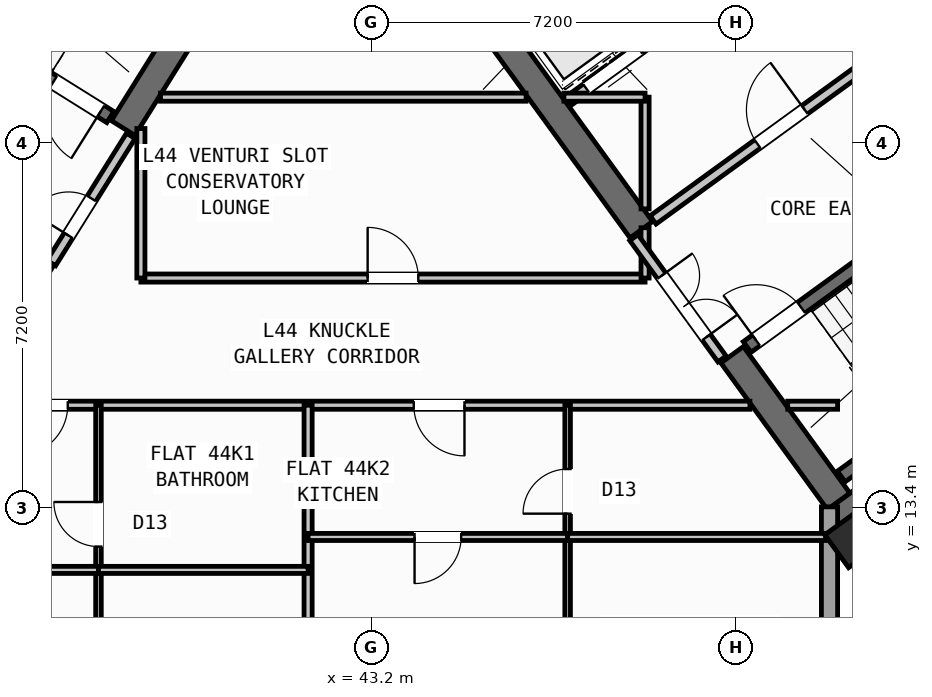
"""IFC4 building model, lengths in metres.
Left out: names, types, materials, properties, quantities, classifications, styles, units other than length and angle.
Written with IfcOpenShell. Run it as: python <this file> out.ifc"""

import sys

from ifc_helpers import new_model, si_unit, direction, frame, frame_2d, origin, origin_2d, place, context, subcontext, project, spatial, rectangle, hollow_rectangle, extrude, source, transform, mapped, element, fill, save


model = new_model("IFC4")
c1 = context("Model", 3, precision=1e-05, world=origin(), true_north=direction((0.0, 1.0)))
c2 = subcontext(c1, "Body", "Model", "MODEL_VIEW")
j1 = project(units=[si_unit("LENGTHUNIT", "METRE"), si_unit("PLANEANGLEUNIT", "RADIAN")], contexts=[c1])
p1 = place(None, origin())
s1 = spatial("IfcSite", under=j1, at=p1, CompositionType="ELEMENT")
p2 = place(p1, origin())
s2 = spatial("IfcBuilding", under=s1, at=p2, CompositionType="ELEMENT")
p3 = place(p2, frame((0.0, 0.0, 174.9)))
s3 = spatial("IfcBuildingStorey", under=s2, at=p3, CompositionType="ELEMENT", Elevation=174.9)
p4 = place(p3, frame((40.194, 23.922, 0.0), z_axis=(0.0, 0.0, 1.0), x_axis=(-0.529888438328, -0.848067357541, 0.0)))
e1 = element("IfcWall", 1, at=p4, inside=s3, PredefinedType="SHEAR", context=c2, shape_type="SweptSolid", body=[
    extrude(rectangle(XDim=3.575, YDim=0.55, at=frame_2d((1.788, 0.0))), origin(), (0.0, 0.0, 1.0), 4.22),
])
p5 = place(p3, frame((36.683, 18.304, 0.0), z_axis=(0.0, 0.0, 1.0), x_axis=(-0.529896466841, -0.848062341122, 0.0)))
e2 = element("IfcWall", 2, at=p5, inside=s3, PredefinedType="SHEAR", context=c2, shape_type="SweptSolid", body=[
    extrude(rectangle(XDim=6.425, YDim=0.55, at=frame_2d((3.212, 0.0))), origin(), (0.0, 0.0, 1.0), 4.22),
])
p6 = place(p3, frame((52.359, 13.14, 0.0), z_axis=(0.0, 0.0, 1.0), x_axis=(0.809014896919, 0.587788139183, 0.0)))
e3 = element("IfcWall", 3, at=p6, inside=s3, PredefinedType="SHEAR", context=c2, shape_type="SweptSolid", body=[
    extrude(rectangle(XDim=12.34, YDim=0.55, at=frame_2d((6.17, 0.0))), origin(), (0.0, 0.0, 1.0), 4.22),
])
p7 = place(p3, frame((52.42, 13.524, 0.0), z_axis=(0.0, 0.0, 1.0), x_axis=(-0.587802113096, 0.809004744015, 0.0)))
e4 = element("IfcWall", 4, at=p7, inside=s3, PredefinedType="SHEAR", context=c2, shape_type="SweptSolid", body=[
    extrude(rectangle(XDim=3.575, YDim=0.55, at=frame_2d((1.788, 0.0))), origin(), (0.0, 0.0, 1.0), 4.22),
])
p8 = place(p3, frame((48.526, 18.884, 0.0), z_axis=(0.0, 0.0, 1.0), x_axis=(-0.587764933797, 0.809031756236, 0.0)))
e5 = element("IfcWall", 5, at=p8, inside=s3, PredefinedType="SHEAR", context=c2, shape_type="SweptSolid", body=[
    extrude(rectangle(XDim=6.425, YDim=0.55, at=frame_2d((3.212, 0.0))), origin(), (0.0, 0.0, 1.0), 4.22),
])
m1 = source(origin(), c2, "Body", "SweptSolid", [
    extrude(hollow_rectangle(XDim=0.8, YDim=0.8, WallThickness=0.032, at=origin_2d()), origin(), (0.0, 0.0, 1.0), 4.5),
])
p9 = place(p3, frame((52.705, 12.773, 0.0), z_axis=(0.0, 0.0, 1.0), x_axis=(0.809016994375, 0.587785252292, 0.0)))
e6 = element("IfcColumn", 6, at=p9, inside=s3, PredefinedType="COLUMN", context=c2, shape_type="MappedRepresentation", body=[
    mapped(m1, transform((0.0, 0.0, 0.0), scale=1.0)),
])
p10 = place(p3, frame((56.581, 7.439, 0.0), z_axis=(0.0, 0.0, 1.0), x_axis=(-0.587771678454, 0.809026856172, 0.0)))
e7 = element("IfcWall", 7, at=p10, inside=s3, PredefinedType="STANDARD", context=c2, shape_type="SweptSolid", body=[
    extrude(rectangle(XDim=6.824, YDim=0.32, at=frame_2d((3.412, 0.0))), origin(), (0.0, 0.0, 1.0), 4.22),
])
p11 = place(p3, frame((52.24, 13.414, 0.0), z_axis=(0.0, 0.0, 1.0), x_axis=(0.0, -1.0, 0.0)))
e8 = element("IfcWall", 8, at=p11, inside=s3, PredefinedType="STANDARD", context=c2, shape_type="SweptSolid", body=[
    extrude(rectangle(XDim=9.948, YDim=0.32, at=frame_2d((4.974, 0.0))), origin(), (0.0, 0.0, 1.0), 4.22),
])
p12 = place(p11, frame((2.92, 0.0, 0.8)))
e9 = element("IfcOpeningElement", 9, at=p12, cuts=e8, PredefinedType="OPENING", context=c2, shape_type="SweptSolid", body=[
    extrude(rectangle(XDim=2.1, YDim=1.55, at=frame_2d((1.05, 0.775))), frame((0.0, 0.17, 0.0), z_axis=(0.0, -1.0, 0.0), x_axis=(1.0, 0.0, 0.0)), (0.0, 0.0, 1.0), 0.34),
])
p13 = place(p11, frame((7.033, 0.0, 0.85)))
e10 = element("IfcOpeningElement", 10, at=p13, cuts=e8, PredefinedType="OPENING", context=c2, shape_type="SweptSolid", body=[
    extrude(rectangle(XDim=1.8, YDim=1.5, at=frame_2d((0.9, 0.75))), frame((0.0, 0.17, 0.0), z_axis=(0.0, -1.0, 0.0), x_axis=(1.0, 0.0, 0.0)), (0.0, 0.0, 1.0), 0.34),
])
p14 = place(p3, frame((38.046, 21.108, 0.0), z_axis=(0.0, 0.0, 1.0), x_axis=(-0.848054434086, 0.529909121291, 0.0)))
e11 = element("IfcWall", 11, at=p14, inside=s3, PredefinedType="SHEAR", context=c2, shape_type="SweptSolid", body=[
    extrude(rectangle(XDim=7.33, YDim=0.26, at=frame_2d((3.665, 0.0))), origin(), (0.0, 0.0, 1.0), 4.22),
])
p15 = place(p14, frame((0.22, 0.0, 0.0)))
e12 = element("IfcOpeningElement", 12, at=p15, cuts=e11, PredefinedType="OPENING", context=c2, shape_type="SweptSolid", body=[
    extrude(rectangle(XDim=1.1, YDim=2.1, at=frame_2d((0.55, 1.05))), frame((0.0, 0.14, 0.0), z_axis=(0.0, -1.0, 0.0), x_axis=(1.0, 0.0, 0.0)), (0.0, 0.0, 1.0), 0.28),
])
p16 = place(p3, frame((52.472, 14.013, 0.0), z_axis=(0.0, 0.0, 1.0), x_axis=(0.809028366311, 0.587769599847, 0.0)))
e13 = element("IfcWall", 13, at=p16, inside=s3, PredefinedType="SHEAR", context=c2, shape_type="SweptSolid", body=[
    extrude(rectangle(XDim=7.33, YDim=0.26, at=frame_2d((3.665, 0.0))), origin(), (0.0, 0.0, 1.0), 4.22),
])
p17 = place(p3, frame((50.615, 16.57, 0.0), z_axis=(0.0, 0.0, 1.0), x_axis=(0.809028366311, 0.587769599847, 0.0)))
e14 = element("IfcWall", 14, at=p17, inside=s3, PredefinedType="SHEAR", context=c2, shape_type="SweptSolid", body=[
    extrude(rectangle(XDim=7.33, YDim=0.26, at=frame_2d((3.665, 0.0))), origin(), (0.0, 0.0, 1.0), 4.22),
])
p18 = place(p17, frame((0.22, 0.0, 0.0)))
e15 = element("IfcOpeningElement", 15, at=p18, cuts=e14, PredefinedType="OPENING", context=c2, shape_type="SweptSolid", body=[
    extrude(rectangle(XDim=1.1, YDim=2.1, at=frame_2d((0.55, 1.05))), frame((0.0, 0.14, 0.0), z_axis=(0.0, -1.0, 0.0), x_axis=(1.0, 0.0, 0.0)), (0.0, 0.0, 1.0), 0.28),
])
p19 = place(p3, frame((47.065, 21.407, 0.0), z_axis=(0.0, 0.0, 1.0), x_axis=(0.809032984992, 0.587763242466, 0.0)))
e16 = element("IfcWall", 16, at=p19, inside=s3, PredefinedType="STANDARD", context=c2, shape_type="SweptSolid", body=[
    extrude(rectangle(XDim=3.448, YDim=0.2, at=frame_2d((1.724, 0.0))), origin(), (0.0, 0.0, 1.0), 4.21),
])
p20 = place(p19, frame((0.458, 0.0, 0.0)))
e17 = element("IfcOpeningElement", 17, at=p20, cuts=e16, PredefinedType="OPENING", context=c2, shape_type="SweptSolid", body=[
    extrude(rectangle(XDim=1.3, YDim=2.2, at=frame_2d((0.65, 1.1))), frame((0.0, 0.11, 0.0), z_axis=(0.0, -1.0, 0.0), x_axis=(1.0, 0.0, 0.0)), (0.0, 0.0, 1.0), 0.22),
])
p21 = place(p3, frame((48.758, 19.077, 0.0), z_axis=(0.0, 0.0, 1.0), x_axis=(0.809005065155, 0.587801671104, 0.0)))
e18 = element("IfcWall", 18, at=p21, inside=s3, PredefinedType="STANDARD", context=c2, shape_type="SweptSolid", body=[
    extrude(rectangle(XDim=5.768, YDim=0.2, at=frame_2d((2.884, 0.0))), origin(), (0.0, 0.0, 1.0), 4.21),
])
p22 = place(p21, frame((2.548, 0.0, 0.0)))
e19 = element("IfcOpeningElement", 19, at=p22, cuts=e18, PredefinedType="OPENING", context=c2, shape_type="SweptSolid", body=[
    extrude(rectangle(XDim=1.15, YDim=2.1, at=frame_2d((0.575, 1.05))), frame((0.0, 0.11, 0.0), z_axis=(0.0, -1.0, 0.0), x_axis=(1.0, 0.0, 0.0)), (0.0, 0.0, 1.0), 0.22),
])
p23 = place(p3, frame((38.451, 20.737, 0.0), z_axis=(0.0, 0.0, 1.0), x_axis=(-0.529924799939, -0.848044637038, 0.0)))
e20 = element("IfcWall", 20, at=p23, inside=s3, PredefinedType="STANDARD", context=c2, shape_type="SweptSolid", body=[
    extrude(rectangle(XDim=2.96, YDim=0.2, at=frame_2d((1.48, 0.0))), origin(), (0.0, 0.0, 1.0), 2.395),
])
p24 = place(p23, frame((1.46, 0.0, 0.0)))
e21 = element("IfcOpeningElement", 21, at=p24, cuts=e20, PredefinedType="OPENING", context=c2, shape_type="SweptSolid", body=[
    extrude(rectangle(XDim=0.86, YDim=2.05, at=frame_2d((0.43, 1.025))), frame((0.0, 0.11, 0.0), z_axis=(0.0, -1.0, 0.0), x_axis=(1.0, 0.0, 0.0)), (0.0, 0.0, 1.0), 0.22),
])
p25 = place(p3, frame((35.237, 15.42, 0.0), z_axis=(0.0, 0.0, 1.0), x_axis=(1.0, 0.0, 0.0)))
e22 = element("IfcWall", 22, at=p25, inside=s3, PredefinedType="PARTITIONING", context=c2, shape_type="SweptSolid", body=[
    extrude(rectangle(XDim=15.432, YDim=0.16, at=frame_2d((7.716, 0.0))), origin(), (0.0, 0.0, 1.0), 4.21),
])
p26 = place(p25, frame((0.969, 0.0, 0.0)))
e23 = element("IfcOpeningElement", 23, at=p26, cuts=e22, PredefinedType="OPENING", context=c2, shape_type="SweptSolid", body=[
    extrude(rectangle(XDim=1.0, YDim=2.1, at=frame_2d((0.5, 1.05))), frame((0.0, 0.09, 0.0), z_axis=(0.0, -1.0, 0.0), x_axis=(1.0, 0.0, 0.0)), (0.0, 0.0, 1.0), 0.18),
])
p27 = place(p25, frame((8.799, 0.0, 0.0)))
e24 = element("IfcOpeningElement", 24, at=p27, cuts=e22, PredefinedType="OPENING", context=c2, shape_type="SweptSolid", body=[
    extrude(rectangle(XDim=1.0, YDim=2.1, at=frame_2d((0.5, 1.05))), frame((0.0, 0.09, 0.0), z_axis=(0.0, -1.0, 0.0), x_axis=(1.0, 0.0, 0.0)), (0.0, 0.0, 1.0), 0.18),
])
p28 = place(p3, frame((51.416, 15.42, 0.0), z_axis=(0.0, 0.0, 1.0), x_axis=(1.0, 0.0, 0.0)))
e25 = element("IfcWall", 25, at=p28, inside=s3, PredefinedType="PARTITIONING", context=c2, shape_type="SweptSolid", body=[
    extrude(rectangle(XDim=0.984, YDim=0.16, at=frame_2d((0.492, 0.0))), origin(), (0.0, 0.0, 1.0), 4.21),
])
p29 = place(p3, frame((38.65, 17.93, 0.0), z_axis=(0.0, 0.0, 1.0), x_axis=(1.0, 0.0, 0.0)))
e26 = element("IfcWall", 26, at=p29, inside=s3, PredefinedType="PARTITIONING", context=c2, shape_type="SweptSolid", body=[
    extrude(rectangle(XDim=9.95, YDim=0.16, at=frame_2d((4.975, 0.0))), origin(), (0.0, 0.0, 1.0), 4.21),
])
p30 = place(p29, frame((4.475, 0.0, 0.0)))
e27 = element("IfcOpeningElement", 27, at=p30, cuts=e26, PredefinedType="OPENING", context=c2, shape_type="SweptSolid", body=[
    extrude(rectangle(XDim=1.0, YDim=2.1, at=frame_2d((0.5, 1.05))), frame((0.0, 0.09, 0.0), z_axis=(0.0, -1.0, 0.0), x_axis=(1.0, 0.0, 0.0)), (0.0, 0.0, 1.0), 0.18),
])
p31 = place(p3, frame((38.65, 17.93, 0.0), z_axis=(0.0, 0.0, 1.0), x_axis=(0.0, 1.0, 0.0)))
e28 = element("IfcWall", 28, at=p31, inside=s3, PredefinedType="PARTITIONING", context=c2, shape_type="SweptSolid", body=[
    extrude(rectangle(XDim=2.951, YDim=0.16, at=frame_2d((1.476, 0.0))), origin(), (0.0, 0.0, 1.0), 4.21),
])
p32 = place(p3, frame((48.6, 17.93, 0.0), z_axis=(0.0, 0.0, 1.0), x_axis=(0.0, 1.0, 0.0)))
e29 = element("IfcWall", 29, at=p32, inside=s3, PredefinedType="PARTITIONING", context=c2, shape_type="SweptSolid", body=[
    extrude(rectangle(XDim=0.993, YDim=0.16, at=frame_2d((0.496, 0.0))), origin(), (0.0, 0.0, 1.0), 4.21),
])
p33 = place(p3, frame((48.6, 19.295, 0.0), z_axis=(0.0, 0.0, 1.0), x_axis=(0.0, 1.0, 0.0)))
e30 = element("IfcWall", 30, at=p33, inside=s3, PredefinedType="PARTITIONING", context=c2, shape_type="SweptSolid", body=[
    extrude(rectangle(XDim=2.205, YDim=0.16, at=frame_2d((1.103, 0.0))), origin(), (0.0, 0.0, 1.0), 4.21),
])
p34 = place(p3, frame((39.037, 21.5, 0.0), z_axis=(0.0, 0.0, 1.0), x_axis=(1.0, 0.0, 0.0)))
e31 = element("IfcWall", 31, at=p34, inside=s3, PredefinedType="PARTITIONING", context=c2, shape_type="SweptSolid", body=[
    extrude(rectangle(XDim=7.215, YDim=0.16, at=frame_2d((3.607, 0.0))), origin(), (0.0, 0.0, 1.0), 4.21),
])
p35 = place(p3, frame((46.998, 21.5, 0.0), z_axis=(0.0, 0.0, 1.0), x_axis=(1.0, 0.0, 0.0)))
e32 = element("IfcWall", 32, at=p35, inside=s3, PredefinedType="PARTITIONING", context=c2, shape_type="SweptSolid", body=[
    extrude(rectangle(XDim=1.602, YDim=0.16, at=frame_2d((0.801, 0.0))), origin(), (0.0, 0.0, 1.0), 4.21),
])
p36 = place(p3, frame((50.119, 16.333, 0.0), z_axis=(0.0, 0.0, 1.0), x_axis=(-0.587749856981, 0.809042709391, 0.0)))
e33 = element("IfcWall", 33, at=p36, inside=s3, PredefinedType="STANDARD", context=c2, shape_type="SweptSolid", body=[
    extrude(rectangle(XDim=2.96, YDim=0.2, at=frame_2d((1.48, 0.0))), origin(), (0.0, 0.0, 1.0), 2.395),
])
p37 = place(p36, frame((0.53, 0.0, 0.0)))
e34 = element("IfcOpeningElement", 34, at=p37, cuts=e33, PredefinedType="OPENING", context=c2, shape_type="SweptSolid", body=[
    extrude(rectangle(XDim=1.5, YDim=2.15, at=frame_2d((0.75, 1.075))), frame((0.0, 0.11, 0.0), z_axis=(0.0, -1.0, 0.0), x_axis=(1.0, 0.0, 0.0)), (0.0, 0.0, 1.0), 0.22),
])
p38 = place(p3, frame((41.95, 1.96, 0.0), z_axis=(0.0, 0.0, 1.0), x_axis=(0.0, 1.0, 0.0)))
e35 = element("IfcWall", 35, at=p38, inside=s3, PredefinedType="PARTITIONING", context=c2, shape_type="SweptSolid", body=[
    extrude(rectangle(XDim=13.46, YDim=0.16, at=frame_2d((6.73, 0.0))), origin(), (0.0, 0.0, 1.0), 4.21),
])
p39 = place(p3, frame((37.813, 1.96, 0.0), z_axis=(0.0, 0.0, 1.0), x_axis=(0.0, 1.0, 0.0)))
e36 = element("IfcWall", 36, at=p39, inside=s3, PredefinedType="PARTITIONING", context=c2, shape_type="SweptSolid", body=[
    extrude(rectangle(XDim=13.46, YDim=0.11, at=frame_2d((6.73, 0.0))), origin(), (0.0, 0.0, 1.0), 4.21),
])
p40 = place(p39, frame((5.5, 0.0, 0.0)))
e37 = element("IfcOpeningElement", 37, at=p40, cuts=e36, PredefinedType="OPENING", context=c2, shape_type="SweptSolid", body=[
    extrude(rectangle(XDim=0.92, YDim=2.08, at=frame_2d((0.46, 1.04))), frame((0.0, 0.065, 0.0), z_axis=(0.0, -1.0, 0.0), x_axis=(1.0, 0.0, 0.0)), (0.0, 0.0, 1.0), 0.13),
])
p41 = place(p39, frame((10.67, 0.0, 0.0)))
e38 = element("IfcOpeningElement", 38, at=p41, cuts=e36, PredefinedType="OPENING", context=c2, shape_type="SweptSolid", body=[
    extrude(rectangle(XDim=0.88, YDim=2.08, at=frame_2d((0.44, 1.04))), frame((0.0, 0.065, 0.0), z_axis=(0.0, -1.0, 0.0), x_axis=(1.0, 0.0, 0.0)), (0.0, 0.0, 1.0), 0.13),
])
p42 = place(p3, frame((33.584, 12.17, 0.0), z_axis=(0.0, 0.0, 1.0), x_axis=(1.0, 0.0, 0.0)))
e39 = element("IfcWall", 39, at=p42, inside=s3, PredefinedType="PLUMBINGWALL", context=c2, shape_type="SweptSolid", body=[
    extrude(rectangle(XDim=4.229, YDim=0.14, at=frame_2d((2.115, 0.0))), origin(), (0.0, 0.0, 1.0), 3.395),
])
p43 = place(p42, frame((0.913, 0.0, 0.0)))
e40 = element("IfcOpeningElement", 40, at=p43, cuts=e39, PredefinedType="OPENING", context=c2, shape_type="SweptSolid", body=[
    extrude(rectangle(XDim=0.92, YDim=2.08, at=frame_2d((0.46, 1.04))), frame((0.0, 0.08, 0.0), z_axis=(0.0, -1.0, 0.0), x_axis=(1.0, 0.0, 0.0)), (0.0, 0.0, 1.0), 0.16),
])
p44 = place(p3, frame((37.813, 12.17, 0.0), z_axis=(0.0, 0.0, 1.0), x_axis=(1.0, 0.0, 0.0)))
e41 = element("IfcWall", 41, at=p44, inside=s3, PredefinedType="PLUMBINGWALL", context=c2, shape_type="SweptSolid", body=[
    extrude(rectangle(XDim=4.137, YDim=0.14, at=frame_2d((2.068, 0.0))), origin(), (0.0, 0.0, 1.0), 3.395),
])
p45 = place(p3, frame((47.072, 1.96, 0.0), z_axis=(0.0, 0.0, 1.0), x_axis=(0.0, 1.0, 0.0)))
e42 = element("IfcWall", 42, at=p45, inside=s3, PredefinedType="PARTITIONING", context=c2, shape_type="SweptSolid", body=[
    extrude(rectangle(XDim=13.46, YDim=0.11, at=frame_2d((6.73, 0.0))), origin(), (0.0, 0.0, 1.0), 4.21),
])
p46 = place(p45, frame((6.6, 0.0, 0.0)))
e43 = element("IfcOpeningElement", 43, at=p46, cuts=e42, PredefinedType="OPENING", context=c2, shape_type="SweptSolid", body=[
    extrude(rectangle(XDim=0.92, YDim=2.08, at=frame_2d((0.46, 1.04))), frame((0.0, 0.065, 0.0), z_axis=(0.0, -1.0, 0.0), x_axis=(1.0, 0.0, 0.0)), (0.0, 0.0, 1.0), 0.13),
])
p47 = place(p45, frame((11.32, 0.0, 0.0)))
e44 = element("IfcOpeningElement", 44, at=p47, cuts=e42, PredefinedType="OPENING", context=c2, shape_type="SweptSolid", body=[
    extrude(rectangle(XDim=0.88, YDim=2.08, at=frame_2d((0.44, 1.04))), frame((0.0, 0.065, 0.0), z_axis=(0.0, -1.0, 0.0), x_axis=(1.0, 0.0, 0.0)), (0.0, 0.0, 1.0), 0.13),
])
p48 = place(p3, frame((41.95, 12.82, 0.0), z_axis=(0.0, 0.0, 1.0), x_axis=(1.0, 0.0, 0.0)))
e45 = element("IfcWall", 45, at=p48, inside=s3, PredefinedType="PLUMBINGWALL", context=c2, shape_type="SweptSolid", body=[
    extrude(rectangle(XDim=5.122, YDim=0.14, at=frame_2d((2.561, 0.0))), origin(), (0.0, 0.0, 1.0), 3.395),
])
p49 = place(p48, frame((2.101, 0.0, 0.0)))
e46 = element("IfcOpeningElement", 46, at=p49, cuts=e45, PredefinedType="OPENING", context=c2, shape_type="SweptSolid", body=[
    extrude(rectangle(XDim=0.92, YDim=2.08, at=frame_2d((0.46, 1.04))), frame((0.0, 0.08, 0.0), z_axis=(0.0, -1.0, 0.0), x_axis=(1.0, 0.0, 0.0)), (0.0, 0.0, 1.0), 0.16),
])
p50 = place(p3, frame((47.072, 12.82, 0.0), z_axis=(0.0, 0.0, 1.0), x_axis=(1.0, 0.0, 0.0)))
e47 = element("IfcWall", 47, at=p50, inside=s3, PredefinedType="PLUMBINGWALL", context=c2, shape_type="SweptSolid", body=[
    extrude(rectangle(XDim=5.09, YDim=0.14, at=frame_2d((2.545, 0.0))), origin(), (0.0, 0.0, 1.0), 3.395),
])
m2 = source(origin(), c2, "Body", "SweptSolid", [
    extrude(rectangle(XDim=1.1, YDim=2.1, at=frame_2d((0.55, 1.05))), frame((0.0, 0.025, 0.0), z_axis=(0.0, -1.0, 0.0), x_axis=(1.0, 0.0, 0.0)), (0.0, 0.0, 1.0), 0.05),
])
p51 = place(p15, origin())
e48 = element("IfcDoor", 48, at=p51, inside=s3, OperationType="SINGLE_SWING_LEFT", PredefinedType="DOOR", context=c2, shape_type="MappedRepresentation", body=[
    mapped(m2, transform((0.0, 0.0, 0.0), scale=1.0)),
])
fill(e12, e48)
p52 = place(p18, origin())
e49 = element("IfcDoor", 49, at=p52, inside=s3, OperationType="SINGLE_SWING_LEFT", PredefinedType="DOOR", context=c2, shape_type="MappedRepresentation", body=[
    mapped(m2, transform((0.0, 0.0, 0.0), scale=1.0)),
])
fill(e15, e49)
m3 = source(origin(), c2, "Body", "SweptSolid", [
    extrude(rectangle(XDim=1.15, YDim=2.1, at=frame_2d((0.575, 1.05))), frame((0.0, 0.025, 0.0), z_axis=(0.0, -1.0, 0.0), x_axis=(1.0, 0.0, 0.0)), (0.0, 0.0, 1.0), 0.05),
])
p53 = place(p22, origin())
e50 = element("IfcDoor", 50, at=p53, inside=s3, OperationType="SINGLE_SWING_RIGHT", PredefinedType="DOOR", context=c2, shape_type="MappedRepresentation", body=[
    mapped(m3, transform((0.0, 0.0, 0.0), scale=1.0)),
])
fill(e19, e50)
m4 = source(origin(), c2, "Body", "SweptSolid", [
    extrude(rectangle(XDim=1.3, YDim=2.2, at=frame_2d((0.65, 1.1))), frame((0.0, 0.025, 0.0), z_axis=(0.0, -1.0, 0.0), x_axis=(1.0, 0.0, 0.0)), (0.0, 0.0, 1.0), 0.05),
])
p54 = place(p20, origin())
e51 = element("IfcDoor", 51, at=p54, inside=s3, OperationType="DOUBLE_DOOR_SLIDING", PredefinedType="DOOR", context=c2, shape_type="MappedRepresentation", body=[
    mapped(m4, transform((0.0, 0.0, 0.0), scale=1.0)),
])
fill(e17, e51)
m5 = source(origin(), c2, "Body", "SweptSolid", [
    extrude(rectangle(XDim=1.0, YDim=2.1, at=frame_2d((0.5, 1.05))), frame((0.0, 0.025, 0.0), z_axis=(0.0, -1.0, 0.0), x_axis=(1.0, 0.0, 0.0)), (0.0, 0.0, 1.0), 0.05),
])
p55 = place(p30, origin())
e52 = element("IfcDoor", 52, at=p55, inside=s3, OperationType="SINGLE_SWING_LEFT", PredefinedType="DOOR", context=c2, shape_type="MappedRepresentation", body=[
    mapped(m5, transform((0.0, 0.0, 0.0), scale=1.0)),
])
fill(e27, e52)
m6 = source(origin(), c2, "Body", "SweptSolid", [
    extrude(rectangle(XDim=0.86, YDim=2.05, at=frame_2d((0.43, 1.025))), frame((0.0, 0.025, 0.0), z_axis=(0.0, -1.0, 0.0), x_axis=(1.0, 0.0, 0.0)), (0.0, 0.0, 1.0), 0.05),
])
p56 = place(p24, frame((0.86, 0.0, 0.0), z_axis=(0.0, 0.0, 1.0), x_axis=(-1.0, 0.0, 0.0)))
e53 = element("IfcDoor", 53, at=p56, inside=s3, OperationType="SINGLE_SWING_LEFT", PredefinedType="DOOR", context=c2, shape_type="MappedRepresentation", body=[
    mapped(m6, transform((0.0, 0.0, 0.0), scale=1.0)),
])
fill(e21, e53)
m7 = source(origin(), c2, "Body", "SweptSolid", [
    extrude(rectangle(XDim=1.5, YDim=2.15, at=frame_2d((0.75, 1.075))), frame((0.0, 0.025, 0.0), z_axis=(0.0, -1.0, 0.0), x_axis=(1.0, 0.0, 0.0)), (0.0, 0.0, 1.0), 0.05),
])
p57 = place(p37, frame((1.5, 0.0, 0.0), z_axis=(0.0, 0.0, 1.0), x_axis=(-1.0, 0.0, 0.0)))
e54 = element("IfcDoor", 54, at=p57, inside=s3, OperationType="DOUBLE_DOOR_SINGLE_SWING", PredefinedType="DOOR", context=c2, shape_type="MappedRepresentation", body=[
    mapped(m7, transform((0.0, 0.0, 0.0), scale=1.0)),
])
fill(e34, e54)
p58 = place(p26, frame((1.0, 0.0, 0.0), z_axis=(0.0, 0.0, 1.0), x_axis=(-1.0, 0.0, 0.0)))
e55 = element("IfcDoor", 55, at=p58, inside=s3, OperationType="SINGLE_SWING_RIGHT", PredefinedType="DOOR", context=c2, shape_type="MappedRepresentation", body=[
    mapped(m5, transform((0.0, 0.0, 0.0), scale=1.0)),
])
fill(e23, e55)
m8 = source(origin(), c2, "Body", "SweptSolid", [
    extrude(rectangle(XDim=0.88, YDim=2.08, at=frame_2d((0.44, 1.04))), frame((0.0, 0.025, 0.0), z_axis=(0.0, -1.0, 0.0), x_axis=(1.0, 0.0, 0.0)), (0.0, 0.0, 1.0), 0.05),
])
p59 = place(p41, origin())
e56 = element("IfcDoor", 56, at=p59, inside=s3, OperationType="SINGLE_SWING_RIGHT", PredefinedType="DOOR", context=c2, shape_type="MappedRepresentation", body=[
    mapped(m8, transform((0.0, 0.0, 0.0), scale=1.0)),
])
fill(e38, e56)
p60 = place(p27, frame((1.0, 0.0, 0.0), z_axis=(0.0, 0.0, 1.0), x_axis=(-1.0, 0.0, 0.0)))
e57 = element("IfcDoor", 57, at=p60, inside=s3, OperationType="SINGLE_SWING_LEFT", PredefinedType="DOOR", context=c2, shape_type="MappedRepresentation", body=[
    mapped(m5, transform((0.0, 0.0, 0.0), scale=1.0)),
])
fill(e24, e57)
m9 = source(origin(), c2, "Body", "SweptSolid", [
    extrude(rectangle(XDim=0.92, YDim=2.08, at=frame_2d((0.46, 1.04))), frame((0.0, 0.025, 0.0), z_axis=(0.0, -1.0, 0.0), x_axis=(1.0, 0.0, 0.0)), (0.0, 0.0, 1.0), 0.05),
])
p61 = place(p49, frame((0.92, 0.0, 0.0), z_axis=(0.0, 0.0, 1.0), x_axis=(-1.0, 0.0, 0.0)))
e58 = element("IfcDoor", 58, at=p61, inside=s3, OperationType="SINGLE_SWING_RIGHT", PredefinedType="DOOR", context=c2, shape_type="MappedRepresentation", body=[
    mapped(m9, transform((0.0, 0.0, 0.0), scale=1.0)),
])
fill(e46, e58)
p62 = place(p47, origin())
e59 = element("IfcDoor", 59, at=p62, inside=s3, OperationType="SINGLE_SWING_LEFT", PredefinedType="DOOR", context=c2, shape_type="MappedRepresentation", body=[
    mapped(m8, transform((0.0, 0.0, 0.0), scale=1.0)),
])
fill(e44, e59)
save(model, sys.argv[1])
